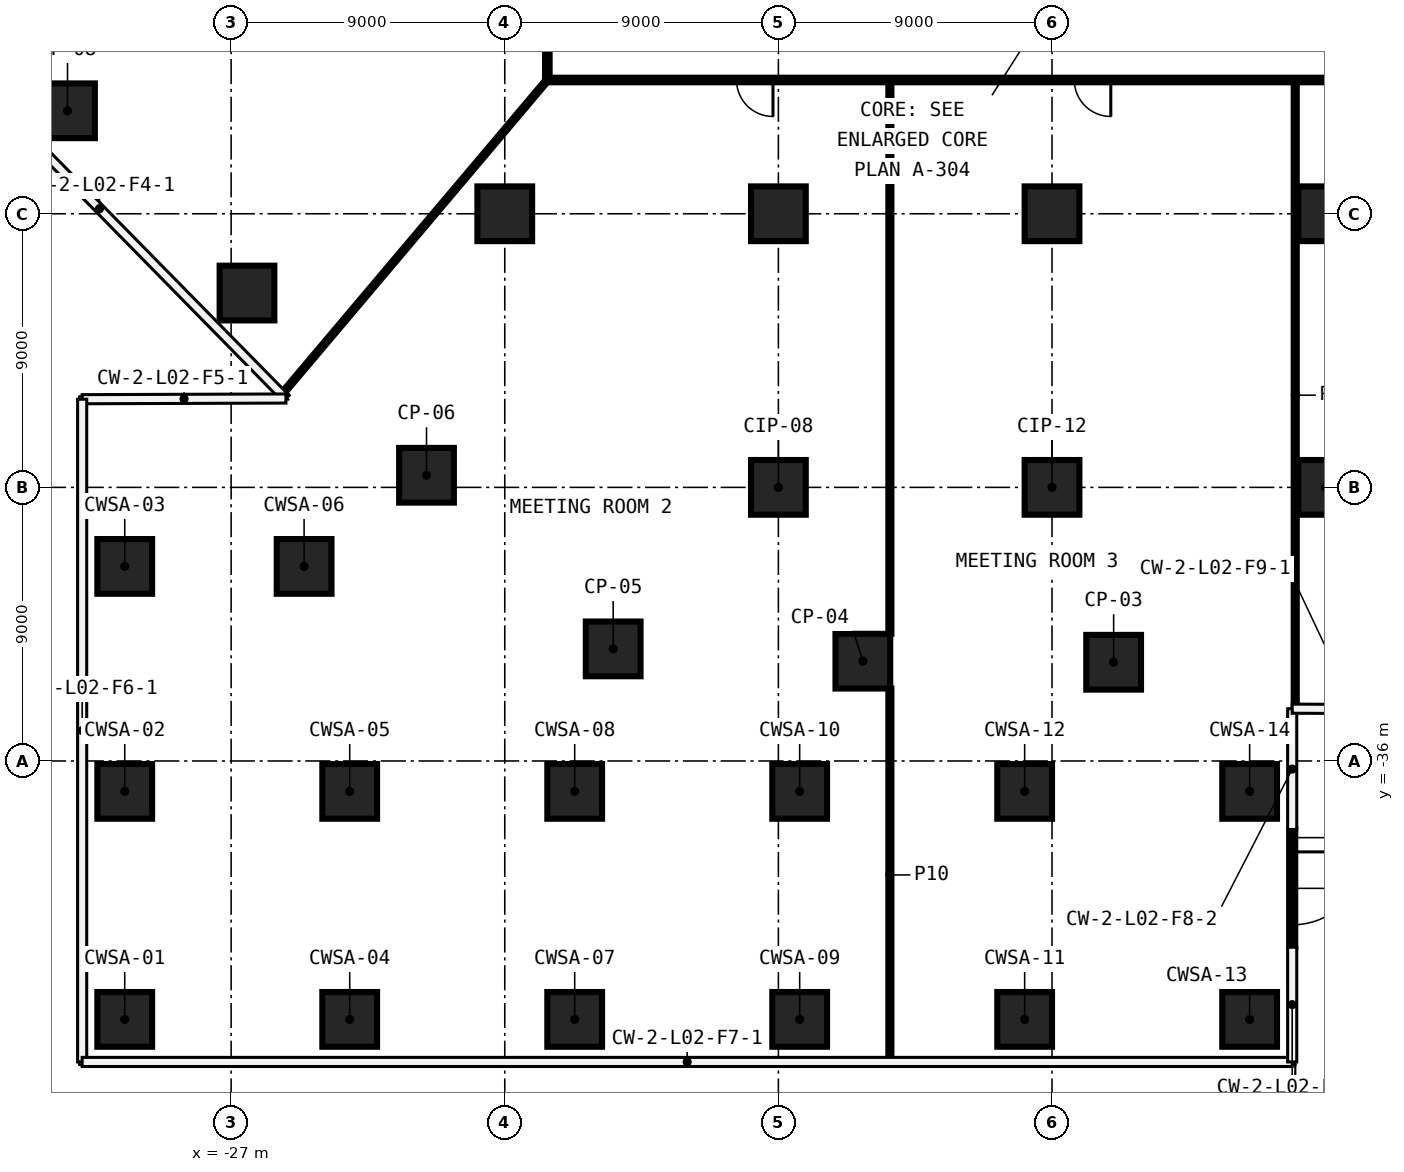
"""IFC4 building model, lengths in metres.
Left out: names, types, materials, properties, quantities, classifications, styles, units other than length and angle.
Written with IfcOpenShell. Run it as: python <this file> out.ifc"""

import sys

from ifc_helpers import new_model, si_unit, direction, frame, frame_2d, origin, origin_2d, place, context, subcontext, project, spatial, rectangle, extrude, element, fill, save


model = new_model("IFC4")
c1 = context("Model", 3, precision=1e-05, world=origin(), true_north=direction((0.0, 1.0)))
c2 = subcontext(c1, "Body", "Model", "MODEL_VIEW")
j1 = project(units=[si_unit("LENGTHUNIT", "METRE"), si_unit("PLANEANGLEUNIT", "RADIAN")], contexts=[c1])
p1 = place(None, origin())
s1 = spatial("IfcSite", under=j1, at=p1, CompositionType="ELEMENT")
p2 = place(p1, origin())
s2 = spatial("IfcBuilding", under=s1, at=p2, CompositionType="ELEMENT")
p3 = place(p2, frame((0.0, 0.0, 19.0)))
s3 = spatial("IfcBuildingStorey", under=s2, at=p3, CompositionType="ELEMENT", Elevation=19.0)
for number, where, z_axis, x_axis in (
    (1, (2.027, -32.753, 0.0), (0.0, 0.0, 1.0), (1.0, 0.0, 0.0)),
    (2, (-6.222, -32.717, 0.0), (0.0, 0.0, 1.0), (1.0, 0.0, 0.0)),
    (3, (-14.434, -32.313, 0.0), (0.0, 0.0, 1.0), (1.0, 0.0, 0.0)),
    (4, (-20.574, -26.602, 0.0), (0.0, 0.0, 1.0), (1.0, 0.0, 0.0)),
    (5, (-26.478, -20.608, 0.0), (0.0, 0.0, 1.0), (1.0, 0.0, 0.0)),
    (6, (-32.382, -14.613, 0.0), (0.0, 0.0, 1.0), (1.0, 0.0, 0.0)),
    (7, (-18.0, -18.0, 0.0), (0.0, 0.0, 1.0), (1.0, 0.0, 0.0)),
    (8, (-9.0, -27.0, 0.0), (0.0, 0.0, 1.0), (1.0, 0.0, 0.0)),
    (9, (-9.0, -18.0, 0.0), (0.0, 0.0, 1.0), (1.0, 0.0, 0.0)),
    (10, (0.0, -27.0, 0.0), (0.0, 0.0, 1.0), (1.0, 0.0, 0.0)),
    (11, (0.0, -18.0, 0.0), (0.0, 0.0, 1.0), (1.0, 0.0, 0.0)),
    (12, (9.0, -27.0, 0.0), (0.0, 0.0, 1.0), (1.0, 0.0, 0.0)),
    (13, (9.0, -18.0, 0.0), (0.0, 0.0, 1.0), (1.0, 0.0, 0.0)),
    (14, (-30.5, -44.5, 0.0), (0.0, 0.0, 1.0), (1.0, 0.0, 0.0)),
    (15, (-30.5, -37.0, 0.0), (0.0, 0.0, 1.0), (1.0, 0.0, 0.0)),
    (16, (-30.5, -29.6, 0.0), (0.0, 0.0, 1.0), (1.0, 0.0, 0.0)),
    (17, (-23.1, -44.5, 0.0), (0.0, 0.0, 1.0), (1.0, 0.0, 0.0)),
    (18, (-23.1, -37.0, 0.0), (0.0, 0.0, 1.0), (1.0, 0.0, 0.0)),
    (19, (-24.6, -29.6, 0.0), (0.0, 0.0, 1.0), (1.0, 0.0, 0.0)),
    (20, (-15.7, -44.5, 0.0), (0.0, 0.0, 1.0), (1.0, 0.0, 0.0)),
    (21, (-15.7, -37.0, 0.0), (0.0, 0.0, 1.0), (1.0, 0.0, 0.0)),
    (22, (-8.3, -44.5, 0.0), (0.0, 0.0, 1.0), (1.0, 0.0, 0.0)),
    (23, (-8.3, -37.0, 0.0), (0.0, 0.0, 1.0), (1.0, 0.0, 0.0)),
    (24, (-0.9, -44.5, 0.0), (0.0, 0.0, 1.0), (1.0, 0.0, 0.0)),
    (25, (-0.9, -37.0, 0.0), (0.0, 0.0, 1.0), (1.0, 0.0, 0.0)),
    (26, (6.5, -44.5, 0.0), (0.0, 0.0, 1.0), (1.0, 0.0, 0.0)),
    (27, (6.5, -37.0, 0.0), (0.0, 0.0, 1.0), (1.0, 0.0, 0.0)),
):
    element("IfcColumn", number, at=place(p3, frame(where, z_axis=z_axis, x_axis=x_axis)), inside=s3, PredefinedType="COLUMN", context=c2, shape_type="SweptSolid", body=[
        extrude(rectangle(XDim=1.8, YDim=1.8, at=origin_2d()), origin(), (0.0, 0.0, 1.0), 7.55),
    ])
p4 = place(p3, frame((16.675, -13.6, 0.0), z_axis=(0.0, 0.0, 1.0), x_axis=(-1.0, 0.0, 0.0)))
e28 = element("IfcWall", 28, at=p4, inside=s3, PredefinedType="PARTITIONING", context=c2, shape_type="SweptSolid", body=[
    extrude(rectangle(XDim=33.35, YDim=0.15, at=frame_2d((16.675, 0.0))), origin(), (0.0, 0.0, 1.0), 7.55),
])
p5 = place(p4, frame((25.853, 0.0, 0.0)))
e29 = element("IfcOpeningElement", 29, at=p5, cuts=e28, PredefinedType="OPENING", context=c2, shape_type="SweptSolid", body=[
    extrude(rectangle(XDim=1.2, YDim=2.1, at=frame_2d((0.6, 1.05))), frame((0.0, 0.085, 0.0), z_axis=(0.0, -1.0, 0.0), x_axis=(1.0, 0.0, 0.0)), (0.0, 0.0, 1.0), 0.17),
])
p6 = place(p4, frame((14.742, 0.0, 0.0)))
e30 = element("IfcOpeningElement", 30, at=p6, cuts=e28, PredefinedType="OPENING", context=c2, shape_type="SweptSolid", body=[
    extrude(rectangle(XDim=1.2, YDim=2.1, at=frame_2d((0.6, 1.05))), frame((0.0, 0.085, 0.0), z_axis=(0.0, -1.0, 0.0), x_axis=(1.0, 0.0, 0.0)), (0.0, 0.0, 1.0), 0.17),
])
p7 = place(p4, frame((1.764, 0.0, 0.0)))
e31 = element("IfcOpeningElement", 31, at=p7, cuts=e28, PredefinedType="OPENING", context=c2, shape_type="SweptSolid", body=[
    extrude(rectangle(XDim=1.2, YDim=2.1, at=frame_2d((0.6, 1.05))), frame((0.0, 0.085, 0.0), z_axis=(0.0, -1.0, 0.0), x_axis=(1.0, 0.0, 0.0)), (0.0, 0.0, 1.0), 0.17),
])
p8 = place(p3, frame((-25.304, -23.908, 0.0), z_axis=(0.0, 0.0, 1.0), x_axis=(0.645188329464, 0.764023572623, 0.0)))
e32 = element("IfcWall", 32, at=p8, inside=s3, PredefinedType="PARTITIONING", context=c2, shape_type="SweptSolid", body=[
    extrude(rectangle(XDim=13.491, YDim=0.1, at=frame_2d((6.746, 0.0))), origin(), (0.0, 0.0, 1.0), 7.55),
])
p9 = place(p3, frame((8.0, -34.26, 0.0), z_axis=(0.0, 0.0, 1.0), x_axis=(0.0, 1.0, 0.0)))
e33 = element("IfcWall", 33, at=p9, inside=s3, PredefinedType="PARTITIONING", context=c2, shape_type="SweptSolid", body=[
    extrude(rectangle(XDim=20.585, YDim=0.1, at=frame_2d((10.292, 0.0))), origin(), (0.0, 0.0, 1.0), 7.55),
])
p10 = place(p3, frame((-5.333, -45.88, 0.0), z_axis=(0.0, 0.0, 1.0), x_axis=(0.0, 1.0, 0.0)))
e34 = element("IfcWall", 34, at=p10, inside=s3, PredefinedType="PARTITIONING", context=c2, shape_type="SweptSolid", body=[
    extrude(rectangle(XDim=12.263, YDim=0.1, at=frame_2d((6.131, 0.0))), origin(), (0.0, 0.0, 1.0), 7.55),
])
p11 = place(p3, frame((-5.333, -31.817, 0.0), z_axis=(0.0, 0.0, 1.0), x_axis=(0.0, 1.0, 0.0)))
e35 = element("IfcWall", 35, at=p11, inside=s3, PredefinedType="PARTITIONING", context=c2, shape_type="SweptSolid", body=[
    extrude(rectangle(XDim=18.142, YDim=0.1, at=frame_2d((9.071, 0.0))), origin(), (0.0, 0.0, 1.0), 7.55),
])
p12 = place(p3, frame((-16.6, -13.525, 0.0), z_axis=(0.0, 0.0, 1.0), x_axis=(0.0, 1.0, 0.0)))
e36 = element("IfcWall", 36, at=p12, inside=s3, PredefinedType="PARTITIONING", context=c2, shape_type="SweptSolid", body=[
    extrude(rectangle(XDim=27.05, YDim=0.15, at=frame_2d((13.525, 0.0))), origin(), (0.0, 0.0, 1.0), 7.55),
])
p13 = place(p12, frame((16.028, 0.0, 0.0)))
e37 = element("IfcOpeningElement", 37, at=p13, cuts=e36, PredefinedType="OPENING", context=c2, shape_type="SweptSolid", body=[
    extrude(rectangle(XDim=1.2, YDim=2.1, at=frame_2d((0.6, 1.05))), frame((0.0, 0.085, 0.0), z_axis=(0.0, -1.0, 0.0), x_axis=(1.0, 0.0, 0.0)), (0.0, 0.0, 1.0), 0.17),
])
p14 = place(p12, frame((1.121, 0.0, 0.0)))
e38 = element("IfcOpeningElement", 38, at=p14, cuts=e36, PredefinedType="OPENING", context=c2, shape_type="SweptSolid", body=[
    extrude(rectangle(XDim=1.2, YDim=2.1, at=frame_2d((0.6, 1.05))), frame((0.0, 0.085, 0.0), z_axis=(0.0, -1.0, 0.0), x_axis=(1.0, 0.0, 0.0)), (0.0, 0.0, 1.0), 0.17),
])
p15 = place(p12, frame((24.705, 0.0, 0.0)))
e39 = element("IfcOpeningElement", 39, at=p15, cuts=e36, PredefinedType="OPENING", context=c2, shape_type="SweptSolid", body=[
    extrude(rectangle(XDim=1.2, YDim=2.1, at=frame_2d((0.6, 1.05))), frame((0.0, 0.085, 0.0), z_axis=(0.0, -1.0, 0.0), x_axis=(1.0, 0.0, 0.0)), (0.0, 0.0, 1.0), 0.17),
])
p16 = place(p3, frame((7.9, -38.253, 0.0), z_axis=(0.0, 0.0, 1.0), x_axis=(0.0, -1.0, 0.0)))
e40 = element("IfcWall", 40, at=p16, inside=s3, PredefinedType="SOLIDWALL", context=c2, shape_type="SweptSolid", body=[
    extrude(rectangle(XDim=3.873, YDim=0.2, at=frame_2d((1.937, 0.0))), origin(), (0.0, 0.0, 1.0), 7.55),
])
p17 = place(p16, frame((0.737, 0.0, 0.0)))
e41 = element("IfcOpeningElement", 41, at=p17, cuts=e40, PredefinedType="OPENING", context=c2, shape_type="SweptSolid", body=[
    extrude(rectangle(XDim=2.4, YDim=2.4, at=frame_2d((1.2, 1.2))), frame((0.0, 0.11, 0.0), z_axis=(0.0, -1.0, 0.0), x_axis=(1.0, 0.0, 0.0)), (0.0, 0.0, 1.0), 0.22),
])
p18 = place(p5, origin())
e42 = element("IfcDoor", 42, at=p18, inside=s3, OperationType="SINGLE_SWING_RIGHT", PredefinedType="DOOR", context=c2, shape_type="SweptSolid", body=[
    extrude(rectangle(XDim=1.2, YDim=2.1, at=frame_2d((0.6, 1.05))), frame((0.0, 0.025, 0.0), z_axis=(0.0, -1.0, 0.0), x_axis=(1.0, 0.0, 0.0)), (0.0, 0.0, 1.0), 0.05),
])
fill(e29, e42)
p19 = place(p6, origin())
e43 = element("IfcDoor", 43, at=p19, inside=s3, OperationType="SINGLE_SWING_LEFT", PredefinedType="DOOR", context=c2, shape_type="SweptSolid", body=[
    extrude(rectangle(XDim=1.2, YDim=2.1, at=frame_2d((0.6, 1.05))), frame((0.0, 0.025, 0.0), z_axis=(0.0, -1.0, 0.0), x_axis=(1.0, 0.0, 0.0)), (0.0, 0.0, 1.0), 0.05),
])
fill(e30, e43)
p20 = place(p17, origin())
e44 = element("IfcDoor", 44, at=p20, inside=s3, OperationType="SINGLE_SWING_LEFT", PredefinedType="DOOR", context=c2, shape_type="SweptSolid", body=[
    extrude(rectangle(XDim=2.4, YDim=2.4, at=frame_2d((1.2, 1.2))), frame((0.0, 0.025, 0.0), z_axis=(0.0, -1.0, 0.0), x_axis=(1.0, 0.0, 0.0)), (0.0, 0.0, 1.0), 0.05),
])
fill(e41, e44)
save(model, sys.argv[1])
